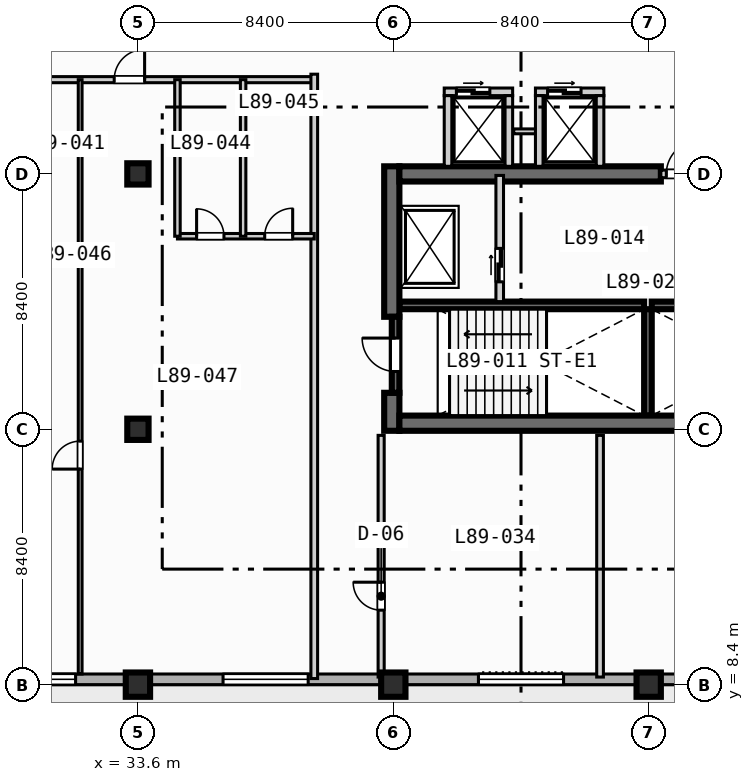
"""IFC4 building model, lengths in metres.
Left out: names, types, materials, properties, quantities, classifications, styles, units other than length and angle.
Written with IfcOpenShell. Run it as: python <this file> out.ifc"""

import sys

from ifc_helpers import new_model, si_unit, direction, frame, frame_2d, origin, origin_2d, place, context, subcontext, project, spatial, rectangle, extrude, element, fill, save


model = new_model("IFC4")
c1 = context("Model", 3, precision=1e-05, world=origin(), true_north=direction((0.0, 1.0)))
c2 = subcontext(c1, "Body", "Model", "MODEL_VIEW")
j1 = project(units=[si_unit("LENGTHUNIT", "METRE"), si_unit("PLANEANGLEUNIT", "RADIAN")], contexts=[c1])
p1 = place(None, origin())
s1 = spatial("IfcSite", under=j1, at=p1, CompositionType="ELEMENT")
p2 = place(p1, origin())
s2 = spatial("IfcBuilding", under=s1, at=p2, CompositionType="ELEMENT")
p3 = place(p2, frame((0.0, 0.0, 359.6)))
s3 = spatial("IfcBuildingStorey", under=s2, at=p3, CompositionType="ELEMENT", Elevation=359.6)
for number, where, z_axis, x_axis in (
    (1, (42.2, 20.875, 0.0), (0.0, 0.0, 1.0), (1.0, 0.0, 0.0)),
    (2, (50.5, 20.875, 0.0), (0.0, 0.0, 1.0), (1.0, 0.0, 0.0)),
):
    element("IfcWall", number, at=place(p3, frame(where, z_axis=z_axis, x_axis=x_axis)), inside=s3, PredefinedType="SOLIDWALL", context=c2, shape_type="SweptSolid", body=[
        extrude(rectangle(XDim=8.05, YDim=0.25, at=frame_2d((4.025, 0.0))), origin(), (0.0, 0.0, 1.0), 3.9),
    ])
p4 = place(p3, frame((50.375, 17.25, 0.0), z_axis=(0.0, 0.0, 1.0), x_axis=(0.0, 1.0, 0.0)))
e3 = element("IfcWall", 3, at=p4, inside=s3, PredefinedType="SOLIDWALL", context=c2, shape_type="SweptSolid", body=[
    extrude(rectangle(XDim=3.5, YDim=0.25, at=frame_2d((1.75, 0.0))), origin(), (0.0, 0.0, 1.0), 3.9),
])
p5 = place(p3, frame((41.95, 16.75, 0.0), z_axis=(0.0, 0.0, 1.0), x_axis=(0.0, 1.0, 0.0)))
e4 = element("IfcWall", 4, at=p5, inside=s3, PredefinedType="SHEAR", context=c2, shape_type="SweptSolid", body=[
    extrude(rectangle(XDim=1.25, YDim=0.5, at=frame_2d((0.625, 0.0))), origin(), (0.0, 0.0, 1.0), 3.9),
])
p6 = place(p3, frame((41.95, 20.5, 0.0), z_axis=(0.0, 0.0, 1.0), x_axis=(0.0, 1.0, 0.0)))
e5 = element("IfcWall", 5, at=p6, inside=s3, PredefinedType="SHEAR", context=c2, shape_type="SweptSolid", body=[
    extrude(rectangle(XDim=4.95, YDim=0.5, at=frame_2d((2.475, 0.0))), origin(), (0.0, 0.0, 1.0), 3.9),
])
p7 = place(p3, frame((42.2, 17.0, 0.0), z_axis=(0.0, 0.0, 1.0), x_axis=(1.0, 0.0, 0.0)))
e6 = element("IfcWall", 6, at=p7, inside=s3, PredefinedType="SHEAR", context=c2, shape_type="SweptSolid", body=[
    extrude(rectangle(XDim=16.35, YDim=0.5, at=frame_2d((8.175, 0.0))), origin(), (0.0, 0.0, 1.0), 3.9),
])
p8 = place(p3, frame((42.2, 25.2, 0.0), z_axis=(0.0, 0.0, 1.0), x_axis=(1.0, 0.0, 0.0)))
e7 = element("IfcWall", 7, at=p8, inside=s3, PredefinedType="SHEAR", context=c2, shape_type="SweptSolid", body=[
    extrude(rectangle(XDim=8.6, YDim=0.5, at=frame_2d((4.3, 0.0))), origin(), (0.0, 0.0, 1.0), 3.9),
])
p9 = place(p3, frame((33.6, 8.4, 0.0), z_axis=(0.0, 0.0, 1.0), x_axis=(1.0, 0.0, 0.0)))
e8 = element("IfcColumn", 8, at=p9, inside=s3, PredefinedType="COLUMN", context=c2, shape_type="SweptSolid", body=[
    extrude(rectangle(XDim=0.8, YDim=0.8, at=origin_2d()), origin(), (0.0, 0.0, 1.0), 4.2),
])
for number, where, z_axis, x_axis in (
    (9, (33.6, 16.8, 0.0), (0.0, 0.0, 1.0), (1.0, 0.0, 0.0)),
    (10, (33.6, 25.2, 0.0), (0.0, 0.0, 1.0), (1.0, 0.0, 0.0)),
):
    element("IfcColumn", number, at=place(p3, frame(where, z_axis=z_axis, x_axis=x_axis)), inside=s3, PredefinedType="COLUMN", context=c2, shape_type="SweptSolid", body=[
        extrude(rectangle(XDim=0.7, YDim=0.7, at=origin_2d()), origin(), (0.0, 0.0, 1.0), 4.2),
    ])
for number, where, z_axis, x_axis in (
    (11, (42.0, 8.4, 0.0), (0.0, 0.0, 1.0), (1.0, 0.0, 0.0)),
    (12, (50.4, 8.4, 0.0), (0.0, 0.0, 1.0), (1.0, 0.0, 0.0)),
):
    element("IfcColumn", number, at=place(p3, frame(where, z_axis=z_axis, x_axis=x_axis)), inside=s3, PredefinedType="COLUMN", context=c2, shape_type="SweptSolid", body=[
        extrude(rectangle(XDim=0.8, YDim=0.8, at=origin_2d()), origin(), (0.0, 0.0, 1.0), 4.2),
    ])
p10 = place(p3, frame((64.025, 8.575, 0.0), z_axis=(0.0, 0.0, 1.0), x_axis=(-1.0, 0.0, 0.0)))
e13 = element("IfcWall", 13, at=p10, inside=s3, PredefinedType="STANDARD", context=c2, shape_type="SweptSolid", body=[
    extrude(rectangle(XDim=52.45, YDim=0.35, at=frame_2d((26.225, 0.0))), origin(), (0.0, 0.0, 1.0), 3.045),
])
p11 = place(p10, frame((34.925, 0.0, 0.0)))
e14 = element("IfcOpeningElement", 14, at=p11, cuts=e13, PredefinedType="OPENING", context=c2, shape_type="SweptSolid", body=[
    extrude(rectangle(XDim=1.4, YDim=2.2, at=frame_2d((0.7, 1.1))), frame((0.0, 0.185, 0.0), z_axis=(0.0, -1.0, 0.0), x_axis=(1.0, 0.0, 0.0)), (0.0, 0.0, 1.0), 0.37),
])
p12 = place(p10, frame((24.825, 0.0, 0.45)))
e15 = element("IfcOpeningElement", 15, at=p12, cuts=e13, PredefinedType="OPENING", context=c2, shape_type="SweptSolid", body=[
    extrude(rectangle(XDim=2.8, YDim=2.1, at=frame_2d((1.4, 1.05))), frame((0.0, 0.185, 0.0), z_axis=(0.0, -1.0, 0.0), x_axis=(1.0, 0.0, 0.0)), (0.0, 0.0, 1.0), 0.37),
])
p13 = place(p10, frame((16.425, 0.0, 0.45)))
e16 = element("IfcOpeningElement", 16, at=p13, cuts=e13, PredefinedType="OPENING", context=c2, shape_type="SweptSolid", body=[
    extrude(rectangle(XDim=2.8, YDim=2.1, at=frame_2d((1.4, 1.05))), frame((0.0, 0.185, 0.0), z_axis=(0.0, -1.0, 0.0), x_axis=(1.0, 0.0, 0.0)), (0.0, 0.0, 1.0), 0.37),
])
p14 = place(p10, frame((50.275, 0.0, 0.85)))
e17 = element("IfcOpeningElement", 17, at=p14, cuts=e13, PredefinedType="OPENING", context=c2, shape_type="SweptSolid", body=[
    extrude(rectangle(XDim=1.8, YDim=1.8, at=frame_2d((0.9, 0.9))), frame((0.0, 0.185, 0.0), z_axis=(0.0, -1.0, 0.0), x_axis=(1.0, 0.0, 0.0)), (0.0, 0.0, 1.0), 0.37),
])
p15 = place(p10, frame((44.875, 0.0, 0.85)))
e18 = element("IfcOpeningElement", 18, at=p15, cuts=e13, PredefinedType="OPENING", context=c2, shape_type="SweptSolid", body=[
    extrude(rectangle(XDim=1.8, YDim=1.8, at=frame_2d((0.9, 0.9))), frame((0.0, 0.185, 0.0), z_axis=(0.0, -1.0, 0.0), x_axis=(1.0, 0.0, 0.0)), (0.0, 0.0, 1.0), 0.37),
])
p16 = place(p10, frame((41.475, 0.0, 0.85)))
e19 = element("IfcOpeningElement", 19, at=p16, cuts=e13, PredefinedType="OPENING", context=c2, shape_type="SweptSolid", body=[
    extrude(rectangle(XDim=1.8, YDim=1.8, at=frame_2d((0.9, 0.9))), frame((0.0, 0.185, 0.0), z_axis=(0.0, -1.0, 0.0), x_axis=(1.0, 0.0, 0.0)), (0.0, 0.0, 1.0), 0.37),
])
p17 = place(p10, frame((32.475, 0.0, 0.85)))
e20 = element("IfcOpeningElement", 20, at=p17, cuts=e13, PredefinedType="OPENING", context=c2, shape_type="SweptSolid", body=[
    extrude(rectangle(XDim=1.8, YDim=1.8, at=frame_2d((0.9, 0.9))), frame((0.0, 0.185, 0.0), z_axis=(0.0, -1.0, 0.0), x_axis=(1.0, 0.0, 0.0)), (0.0, 0.0, 1.0), 0.37),
])
p18 = place(p3, frame((42.075, 18.0, 0.0), z_axis=(0.0, 0.0, 1.0), x_axis=(0.0, 1.0, 0.0)))
e21 = element("IfcWall", 21, at=p18, inside=s3, PredefinedType="SOLIDWALL", context=c2, shape_type="SweptSolid", body=[
    extrude(rectangle(XDim=2.5, YDim=0.25, at=frame_2d((1.25, 0.0))), origin(), (0.0, 0.0, 1.0), 3.9),
])
p19 = place(p18, frame((0.7, 0.0, 0.0)))
e22 = element("IfcOpeningElement", 22, at=p19, cuts=e21, PredefinedType="OPENING", context=c2, shape_type="SweptSolid", body=[
    extrude(rectangle(XDim=1.1, YDim=2.15, at=frame_2d((0.55, 1.075))), frame((0.0, 0.135, 0.0), z_axis=(0.0, -1.0, 0.0), x_axis=(1.0, 0.0, 0.0)), (0.0, 0.0, 1.0), 0.27),
])
p20 = place(p3, frame((45.5, 21.0, 0.0), z_axis=(0.0, 0.0, 1.0), x_axis=(0.0, 1.0, 0.0)))
e23 = element("IfcWall", 23, at=p20, inside=s3, PredefinedType="SOLIDWALL", context=c2, shape_type="SweptSolid", body=[
    extrude(rectangle(XDim=4.15, YDim=0.25, at=frame_2d((2.075, 0.0))), origin(), (0.0, 0.0, 1.0), 3.9),
])
p21 = place(p20, frame((0.65, 0.0, 0.0)))
e24 = element("IfcOpeningElement", 24, at=p21, cuts=e23, PredefinedType="OPENING", context=c2, shape_type="SweptSolid", body=[
    extrude(rectangle(XDim=1.1, YDim=2.15, at=frame_2d((0.55, 1.075))), frame((0.0, 0.135, 0.0), z_axis=(0.0, -1.0, 0.0), x_axis=(1.0, 0.0, 0.0)), (0.0, 0.0, 1.0), 0.27),
])
p22 = place(p3, frame((50.8, 25.2, 0.0), z_axis=(0.0, 0.0, 1.0), x_axis=(1.0, 0.0, 0.0)))
e25 = element("IfcWall", 25, at=p22, inside=s3, PredefinedType="SOLIDWALL", context=c2, shape_type="SweptSolid", body=[
    extrude(rectangle(XDim=1.48, YDim=0.25, at=frame_2d((0.74, 0.0))), origin(), (0.0, 0.0, 1.0), 3.9),
])
p23 = place(p22, frame((0.18, 0.0, 0.0)))
e26 = element("IfcOpeningElement", 26, at=p23, cuts=e25, PredefinedType="OPENING", context=c2, shape_type="SweptSolid", body=[
    extrude(rectangle(XDim=1.1, YDim=2.15, at=frame_2d((0.55, 1.075))), frame((0.0, 0.135, 0.0), z_axis=(0.0, -1.0, 0.0), x_axis=(1.0, 0.0, 0.0)), (0.0, 0.0, 1.0), 0.27),
])
p24 = place(p3, frame((43.675, 27.9, 0.0), z_axis=(0.0, 0.0, 1.0), x_axis=(1.0, 0.0, 0.0)))
e27 = element("IfcWall", 27, at=p24, inside=s3, PredefinedType="SOLIDWALL", context=c2, shape_type="SweptSolid", body=[
    extrude(rectangle(XDim=2.25, YDim=0.25, at=frame_2d((1.125, 0.0))), origin(), (0.0, 0.0, 1.0), 3.9),
])
p25 = place(p24, frame((0.4, 0.0, 0.0)))
e28 = element("IfcOpeningElement", 28, at=p25, cuts=e27, PredefinedType="OPENING", context=c2, shape_type="SweptSolid", body=[
    extrude(rectangle(XDim=1.1, YDim=2.15, at=frame_2d((0.55, 1.075))), frame((0.0, 0.135, 0.0), z_axis=(0.0, -1.0, 0.0), x_axis=(1.0, 0.0, 0.0)), (0.0, 0.0, 1.0), 0.27),
])
for number, where, z_axis, x_axis in (
    (29, (43.8, 25.45, 0.0), (0.0, 0.0, 1.0), (0.0, 1.0, 0.0)),
    (30, (45.8, 25.45, 0.0), (0.0, 0.0, 1.0), (0.0, 1.0, 0.0)),
):
    element("IfcWall", number, at=place(p3, frame(where, z_axis=z_axis, x_axis=x_axis)), inside=s3, PredefinedType="SOLIDWALL", context=c2, shape_type="SweptSolid", body=[
        extrude(rectangle(XDim=2.325, YDim=0.25, at=frame_2d((1.163, 0.0))), origin(), (0.0, 0.0, 1.0), 3.9),
    ])
p26 = place(p3, frame((45.96, 26.6, 0.0), z_axis=(0.0, 0.0, 1.0), x_axis=(1.0, 0.0, 0.0)))
e31 = element("IfcWall", 31, at=p26, inside=s3, PredefinedType="PARTITIONING", context=c2, shape_type="SweptSolid", body=[
    extrude(rectangle(XDim=0.88, YDim=0.16, at=frame_2d((0.44, 0.0))), origin(), (0.0, 0.0, 1.0), 3.9),
])
p27 = place(p3, frame((46.675, 27.9, 0.0), z_axis=(0.0, 0.0, 1.0), x_axis=(1.0, 0.0, 0.0)))
e32 = element("IfcWall", 32, at=p27, inside=s3, PredefinedType="SOLIDWALL", context=c2, shape_type="SweptSolid", body=[
    extrude(rectangle(XDim=2.25, YDim=0.25, at=frame_2d((1.125, 0.0))), origin(), (0.0, 0.0, 1.0), 3.9),
])
p28 = place(p27, frame((0.4, 0.0, 0.0)))
e33 = element("IfcOpeningElement", 33, at=p28, cuts=e32, PredefinedType="OPENING", context=c2, shape_type="SweptSolid", body=[
    extrude(rectangle(XDim=1.1, YDim=2.15, at=frame_2d((0.55, 1.075))), frame((0.0, 0.135, 0.0), z_axis=(0.0, -1.0, 0.0), x_axis=(1.0, 0.0, 0.0)), (0.0, 0.0, 1.0), 0.27),
])
for number, where, z_axis, x_axis in (
    (34, (46.8, 25.45, 0.0), (0.0, 0.0, 1.0), (0.0, 1.0, 0.0)),
    (35, (48.8, 25.45, 0.0), (0.0, 0.0, 1.0), (0.0, 1.0, 0.0)),
):
    element("IfcWall", number, at=place(p3, frame(where, z_axis=z_axis, x_axis=x_axis)), inside=s3, PredefinedType="SOLIDWALL", context=c2, shape_type="SweptSolid", body=[
        extrude(rectangle(XDim=2.325, YDim=0.25, at=frame_2d((1.163, 0.0))), origin(), (0.0, 0.0, 1.0), 3.9),
    ])
p29 = place(p3, frame((41.6, 8.65, 0.0), z_axis=(0.0, 0.0, 1.0), x_axis=(0.0, 1.0, 0.0)))
e36 = element("IfcWall", 36, at=p29, inside=s3, PredefinedType="PARTITIONING", context=c2, shape_type="SweptSolid", body=[
    extrude(rectangle(XDim=7.95, YDim=0.2, at=frame_2d((3.975, 0.0))), origin(), (0.0, 0.0, 1.0), 3.9),
])
p30 = place(p29, frame((2.2, 0.0, 0.0)))
e37 = element("IfcOpeningElement", 37, at=p30, cuts=e36, PredefinedType="OPENING", context=c2, shape_type="SweptSolid", body=[
    extrude(rectangle(XDim=0.92, YDim=2.1, at=frame_2d((0.46, 1.05))), frame((0.0, 0.11, 0.0), z_axis=(0.0, -1.0, 0.0), x_axis=(1.0, 0.0, 0.0)), (0.0, 0.0, 1.0), 0.22),
])
p31 = place(p3, frame((48.8, 8.65, 0.0), z_axis=(0.0, 0.0, 1.0), x_axis=(0.0, 1.0, 0.0)))
e38 = element("IfcWall", 38, at=p31, inside=s3, PredefinedType="PARTITIONING", context=c2, shape_type="SweptSolid", body=[
    extrude(rectangle(XDim=7.95, YDim=0.22, at=frame_2d((3.975, 0.0))), origin(), (0.0, 0.0, 1.0), 3.9),
])
p32 = place(p3, frame((11.8, 28.3, 0.0), z_axis=(0.0, 0.0, 1.0), x_axis=(1.0, 0.0, 0.0)))
e39 = element("IfcWall", 39, at=p32, inside=s3, PredefinedType="PARTITIONING", context=c2, shape_type="SweptSolid", body=[
    extrude(rectangle(XDim=27.6, YDim=0.2, at=frame_2d((13.8, 0.0))), origin(), (0.0, 0.0, 1.0), 3.9),
])
p33 = place(p32, frame((2.72, 0.0, 0.0)))
e40 = element("IfcOpeningElement", 40, at=p33, cuts=e39, PredefinedType="OPENING", context=c2, shape_type="SweptSolid", body=[
    extrude(rectangle(XDim=1.0, YDim=2.15, at=frame_2d((0.5, 1.075))), frame((0.0, 0.11, 0.0), z_axis=(0.0, -1.0, 0.0), x_axis=(1.0, 0.0, 0.0)), (0.0, 0.0, 1.0), 0.22),
])
p34 = place(p32, frame((11.62, 0.0, 0.0)))
e41 = element("IfcOpeningElement", 41, at=p34, cuts=e39, PredefinedType="OPENING", context=c2, shape_type="SweptSolid", body=[
    extrude(rectangle(XDim=1.0, YDim=2.15, at=frame_2d((0.5, 1.075))), frame((0.0, 0.11, 0.0), z_axis=(0.0, -1.0, 0.0), x_axis=(1.0, 0.0, 0.0)), (0.0, 0.0, 1.0), 0.22),
])
p35 = place(p32, frame((21.02, 0.0, 0.0)))
e42 = element("IfcOpeningElement", 42, at=p35, cuts=e39, PredefinedType="OPENING", context=c2, shape_type="SweptSolid", body=[
    extrude(rectangle(XDim=1.0, YDim=2.15, at=frame_2d((0.5, 1.075))), frame((0.0, 0.11, 0.0), z_axis=(0.0, -1.0, 0.0), x_axis=(1.0, 0.0, 0.0)), (0.0, 0.0, 1.0), 0.22),
])
p36 = place(p3, frame((39.4, 8.6, 0.0), z_axis=(0.0, 0.0, 1.0), x_axis=(0.0, 1.0, 0.0)))
e43 = element("IfcWall", 43, at=p36, inside=s3, PredefinedType="PARTITIONING", context=c2, shape_type="SweptSolid", body=[
    extrude(rectangle(XDim=19.88, YDim=0.22, at=frame_2d((9.94, 0.0))), origin(), (0.0, 0.0, 1.0), 3.9),
])
p37 = place(p3, frame((34.9, 23.15, 0.0), z_axis=(0.0, 0.0, 1.0), x_axis=(1.0, 0.0, 0.0)))
e44 = element("IfcWall", 44, at=p37, inside=s3, PredefinedType="PLUMBINGWALL", context=c2, shape_type="SweptSolid", body=[
    extrude(rectangle(XDim=4.5, YDim=0.18, at=frame_2d((2.25, 0.0))), origin(), (0.0, 0.0, 1.0), 3.9),
])
p38 = place(p37, frame((0.63, 0.0, 0.0)))
e45 = element("IfcOpeningElement", 45, at=p38, cuts=e44, PredefinedType="OPENING", context=c2, shape_type="SweptSolid", body=[
    extrude(rectangle(XDim=0.9, YDim=2.1, at=frame_2d((0.45, 1.05))), frame((0.0, 0.1, 0.0), z_axis=(0.0, -1.0, 0.0), x_axis=(1.0, 0.0, 0.0)), (0.0, 0.0, 1.0), 0.2),
])
p39 = place(p37, frame((2.87, 0.0, 0.0)))
e46 = element("IfcOpeningElement", 46, at=p39, cuts=e44, PredefinedType="OPENING", context=c2, shape_type="SweptSolid", body=[
    extrude(rectangle(XDim=0.92, YDim=2.1, at=frame_2d((0.46, 1.05))), frame((0.0, 0.1, 0.0), z_axis=(0.0, -1.0, 0.0), x_axis=(1.0, 0.0, 0.0)), (0.0, 0.0, 1.0), 0.2),
])
for number, where, z_axis, x_axis in (
    (47, (34.9, 23.15, 0.0), (0.0, 0.0, 1.0), (0.0, 1.0, 0.0)),
    (48, (37.06, 23.15, 0.0), (0.0, 0.0, 1.0), (0.0, 1.0, 0.0)),
):
    element("IfcWall", number, at=place(p3, frame(where, z_axis=z_axis, x_axis=x_axis)), inside=s3, PredefinedType="PLUMBINGWALL", context=c2, shape_type="SweptSolid", body=[
        extrude(rectangle(XDim=5.15, YDim=0.18, at=frame_2d((2.575, 0.0))), origin(), (0.0, 0.0, 1.0), 3.9),
    ])
p40 = place(p3, frame((31.7, 8.75, 0.0), z_axis=(0.0, 0.0, 1.0), x_axis=(0.0, 1.0, 0.0)))
e49 = element("IfcWall", 49, at=p40, inside=s3, PredefinedType="PARTITIONING", context=c2, shape_type="SweptSolid", body=[
    extrude(rectangle(XDim=19.55, YDim=0.125, at=frame_2d((9.775, 0.0))), origin(), (0.0, 0.0, 1.0), 3.9),
])
p41 = place(p40, frame((6.74, 0.0, 0.0)))
e50 = element("IfcOpeningElement", 50, at=p41, cuts=e49, PredefinedType="OPENING", context=c2, shape_type="SweptSolid", body=[
    extrude(rectangle(XDim=0.92, YDim=2.1, at=frame_2d((0.46, 1.05))), frame((0.0, 0.073, 0.0), z_axis=(0.0, -1.0, 0.0), x_axis=(1.0, 0.0, 0.0)), (0.0, 0.0, 1.0), 0.145),
])
p42 = place(p12, origin())
e51 = element("IfcWindow", 51, at=p42, inside=s3, PartitioningType="SINGLE_PANEL", PredefinedType="WINDOW", context=c2, shape_type="SweptSolid", body=[
    extrude(rectangle(XDim=2.8, YDim=2.1, at=frame_2d((1.4, 1.05))), frame((0.0, 0.03, 0.0), z_axis=(0.0, -1.0, 0.0), x_axis=(1.0, 0.0, 0.0)), (0.0, 0.0, 1.0), 0.06),
])
fill(e15, e51)
p43 = place(p13, origin())
e52 = element("IfcWindow", 52, at=p43, inside=s3, PartitioningType="SINGLE_PANEL", PredefinedType="WINDOW", context=c2, shape_type="SweptSolid", body=[
    extrude(rectangle(XDim=2.8, YDim=2.1, at=frame_2d((1.4, 1.05))), frame((0.0, 0.03, 0.0), z_axis=(0.0, -1.0, 0.0), x_axis=(1.0, 0.0, 0.0)), (0.0, 0.0, 1.0), 0.06),
])
fill(e16, e52)
p44 = place(p17, origin())
e53 = element("IfcWindow", 53, at=p44, inside=s3, PartitioningType="SINGLE_PANEL", PredefinedType="WINDOW", context=c2, shape_type="SweptSolid", body=[
    extrude(rectangle(XDim=1.8, YDim=1.8, at=frame_2d((0.9, 0.9))), frame((0.0, 0.03, 0.0), z_axis=(0.0, -1.0, 0.0), x_axis=(1.0, 0.0, 0.0)), (0.0, 0.0, 1.0), 0.06),
])
fill(e20, e53)
p45 = place(p19, origin())
e54 = element("IfcDoor", 54, at=p45, inside=s3, OperationType="SINGLE_SWING_RIGHT", PredefinedType="DOOR", context=c2, shape_type="SweptSolid", body=[
    extrude(rectangle(XDim=1.1, YDim=2.15, at=frame_2d((0.55, 1.075))), frame((0.0, 0.025, 0.0), z_axis=(0.0, -1.0, 0.0), x_axis=(1.0, 0.0, 0.0)), (0.0, 0.0, 1.0), 0.05),
])
fill(e22, e54)
p46 = place(p21, origin())
e55 = element("IfcDoor", 55, at=p46, inside=s3, OperationType="SLIDING_TO_LEFT", PredefinedType="DOOR", context=c2, shape_type="SweptSolid", body=[
    extrude(rectangle(XDim=1.1, YDim=2.15, at=frame_2d((0.55, 1.075))), frame((0.0, 0.025, 0.0), z_axis=(0.0, -1.0, 0.0), x_axis=(1.0, 0.0, 0.0)), (0.0, 0.0, 1.0), 0.05),
])
fill(e24, e55)
p47 = place(p23, origin())
e56 = element("IfcDoor", 56, at=p47, inside=s3, OperationType="SINGLE_SWING_RIGHT", PredefinedType="DOOR", context=c2, shape_type="SweptSolid", body=[
    extrude(rectangle(XDim=1.1, YDim=2.15, at=frame_2d((0.55, 1.075))), frame((0.0, 0.025, 0.0), z_axis=(0.0, -1.0, 0.0), x_axis=(1.0, 0.0, 0.0)), (0.0, 0.0, 1.0), 0.05),
])
fill(e26, e56)
p48 = place(p25, origin())
e57 = element("IfcDoor", 57, at=p48, inside=s3, OperationType="SLIDING_TO_LEFT", PredefinedType="DOOR", context=c2, shape_type="SweptSolid", body=[
    extrude(rectangle(XDim=1.1, YDim=2.15, at=frame_2d((0.55, 1.075))), frame((0.0, 0.025, 0.0), z_axis=(0.0, -1.0, 0.0), x_axis=(1.0, 0.0, 0.0)), (0.0, 0.0, 1.0), 0.05),
])
fill(e28, e57)
p49 = place(p28, origin())
e58 = element("IfcDoor", 58, at=p49, inside=s3, OperationType="SLIDING_TO_LEFT", PredefinedType="DOOR", context=c2, shape_type="SweptSolid", body=[
    extrude(rectangle(XDim=1.1, YDim=2.15, at=frame_2d((0.55, 1.075))), frame((0.0, 0.025, 0.0), z_axis=(0.0, -1.0, 0.0), x_axis=(1.0, 0.0, 0.0)), (0.0, 0.0, 1.0), 0.05),
])
fill(e33, e58)
p50 = place(p30, origin())
e59 = element("IfcDoor", 59, at=p50, inside=s3, OperationType="SINGLE_SWING_RIGHT", PredefinedType="DOOR", context=c2, shape_type="SweptSolid", body=[
    extrude(rectangle(XDim=0.92, YDim=2.1, at=frame_2d((0.46, 1.05))), frame((0.0, 0.025, 0.0), z_axis=(0.0, -1.0, 0.0), x_axis=(1.0, 0.0, 0.0)), (0.0, 0.0, 1.0), 0.05),
])
fill(e37, e59)
p51 = place(p35, origin())
e60 = element("IfcDoor", 60, at=p51, inside=s3, OperationType="SINGLE_SWING_RIGHT", PredefinedType="DOOR", context=c2, shape_type="SweptSolid", body=[
    extrude(rectangle(XDim=1.0, YDim=2.15, at=frame_2d((0.5, 1.075))), frame((0.0, 0.025, 0.0), z_axis=(0.0, -1.0, 0.0), x_axis=(1.0, 0.0, 0.0)), (0.0, 0.0, 1.0), 0.05),
])
fill(e42, e60)
p52 = place(p38, origin())
e61 = element("IfcDoor", 61, at=p52, inside=s3, OperationType="SINGLE_SWING_LEFT", PredefinedType="DOOR", context=c2, shape_type="SweptSolid", body=[
    extrude(rectangle(XDim=0.9, YDim=2.1, at=frame_2d((0.45, 1.05))), frame((0.0, 0.025, 0.0), z_axis=(0.0, -1.0, 0.0), x_axis=(1.0, 0.0, 0.0)), (0.0, 0.0, 1.0), 0.05),
])
fill(e45, e61)
p53 = place(p39, origin())
e62 = element("IfcDoor", 62, at=p53, inside=s3, OperationType="SINGLE_SWING_RIGHT", PredefinedType="DOOR", context=c2, shape_type="SweptSolid", body=[
    extrude(rectangle(XDim=0.92, YDim=2.1, at=frame_2d((0.46, 1.05))), frame((0.0, 0.025, 0.0), z_axis=(0.0, -1.0, 0.0), x_axis=(1.0, 0.0, 0.0)), (0.0, 0.0, 1.0), 0.05),
])
fill(e46, e62)
p54 = place(p41, origin())
e63 = element("IfcDoor", 63, at=p54, inside=s3, OperationType="SINGLE_SWING_LEFT", PredefinedType="DOOR", context=c2, shape_type="SweptSolid", body=[
    extrude(rectangle(XDim=0.92, YDim=2.1, at=frame_2d((0.46, 1.05))), frame((0.0, 0.025, 0.0), z_axis=(0.0, -1.0, 0.0), x_axis=(1.0, 0.0, 0.0)), (0.0, 0.0, 1.0), 0.05),
])
fill(e50, e63)
save(model, sys.argv[1])
